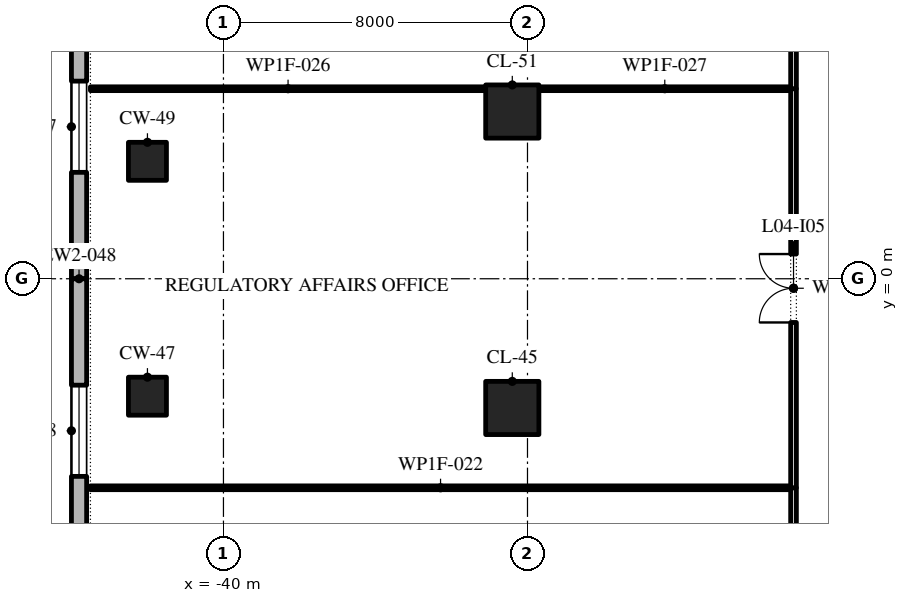
"""IFC4 building model, lengths in metres.
Left out: names, types, materials, properties, quantities, classifications, styles, units other than length and angle.
Written with IfcOpenShell. Run it as: python <this file> out.ifc"""

import sys

from ifc_helpers import new_model, si_unit, direction, frame, frame_2d, origin, origin_2d, place, context, subcontext, project, spatial, polyline, rectangle, outline, extrude, element, fill, save


model = new_model("IFC4")
c1 = context("Model", 3, precision=1e-05, world=origin(), true_north=direction((0.0, 1.0)))
c2 = subcontext(c1, "Body", "Model", "MODEL_VIEW")
j1 = project(units=[si_unit("LENGTHUNIT", "METRE"), si_unit("PLANEANGLEUNIT", "RADIAN")], contexts=[c1])
p1 = place(None, origin())
s1 = spatial("IfcSite", under=j1, at=p1, CompositionType="ELEMENT")
p2 = place(p1, origin())
s2 = spatial("IfcBuilding", under=s1, at=p2, CompositionType="ELEMENT")
p3 = place(p2, frame((0.0, 0.0, 24.0)))
s3 = spatial("IfcBuildingStorey", under=s2, at=p3, CompositionType="ELEMENT", Elevation=24.0)
p4 = place(p3, frame((-32.4, -3.4, 0.0), z_axis=(0.0, 0.0, 1.0), x_axis=(1.0, 0.0, 0.0)))
e1 = element("IfcColumn", 1, at=p4, inside=s3, PredefinedType="COLUMN", context=c2, shape_type="SweptSolid", body=[
    extrude(rectangle(XDim=1.4, YDim=1.4, at=origin_2d()), origin(), (0.0, 0.0, 1.0), 4.8),
])
for number, where, z_axis, x_axis in (
    (2, (-42.0, -3.09, 0.0), (0.0, 0.0, 1.0), (1.0, 0.0, 0.0)),
    (3, (-42.0, 3.09, 0.0), (0.0, 0.0, 1.0), (1.0, 0.0, 0.0)),
):
    element("IfcColumn", number, at=place(p3, frame(where, z_axis=z_axis, x_axis=x_axis)), inside=s3, PredefinedType="COLUMN", context=c2, shape_type="SweptSolid", body=[
        extrude(rectangle(XDim=1.0, YDim=1.0, at=origin_2d()), origin(), (0.0, 0.0, 1.0), 4.8),
    ])
p5 = place(p3, frame((-32.4, 4.4, 0.0), z_axis=(0.0, 0.0, 1.0), x_axis=(1.0, 0.0, 0.0)))
e4 = element("IfcColumn", 4, at=p5, inside=s3, PredefinedType="COLUMN", context=c2, shape_type="SweptSolid", body=[
    extrude(rectangle(XDim=1.4, YDim=1.4, at=origin_2d()), origin(), (0.0, 0.0, 1.0), 4.8),
])
p6 = place(p3, frame((-43.8, 8.0, 0.0), z_axis=(0.0, 0.0, 1.0), x_axis=(0.0, -1.0, 0.0)))
e5 = element("IfcWall", 5, at=p6, inside=s3, PredefinedType="STANDARD", context=c2, shape_type="SweptSolid", body=[
    extrude(rectangle(XDim=8.0, YDim=0.4, at=frame_2d((4.0, 0.0))), origin(), (0.0, 0.0, 1.0), 4.5),
])
p7 = place(p6, frame((2.8, 0.0, 0.9)))
e6 = element("IfcOpeningElement", 6, at=p7, cuts=e5, PredefinedType="OPENING", context=c2, shape_type="SweptSolid", body=[
    extrude(outline(polyline([(0.0, 0.0), (2.4, 0.0), (2.4, 1.5), (2.378, 1.758), (2.313, 2.009), (2.207, 2.245), (2.063, 2.46), (1.885, 2.648), (1.677, 2.804), (1.447, 2.922), (1.2, 3.0), (0.953, 2.922), (0.722, 2.804), (0.515, 2.648), (0.337, 2.46), (0.193, 2.245), (0.087, 2.009), (0.022, 1.758), (0.0, 1.5), (0.0, 0.0)])), frame((0.0, 0.21, 0.0), z_axis=(0.0, -1.0, 0.0), x_axis=(1.0, 0.0, 0.0)), (0.0, 0.0, 1.0), 0.42),
])
p8 = place(p3, frame((-43.8, 0.0, 0.0), z_axis=(0.0, 0.0, 1.0), x_axis=(0.0, -1.0, 0.0)))
e7 = element("IfcWall", 7, at=p8, inside=s3, PredefinedType="STANDARD", context=c2, shape_type="SweptSolid", body=[
    extrude(rectangle(XDim=8.0, YDim=0.4, at=frame_2d((4.0, 0.0))), origin(), (0.0, 0.0, 1.0), 4.5),
])
p9 = place(p8, frame((2.8, 0.0, 0.9)))
e8 = element("IfcOpeningElement", 8, at=p9, cuts=e7, PredefinedType="OPENING", context=c2, shape_type="SweptSolid", body=[
    extrude(outline(polyline([(0.0, 0.0), (2.4, 0.0), (2.4, 1.5), (2.378, 1.758), (2.313, 2.009), (2.207, 2.245), (2.063, 2.46), (1.885, 2.648), (1.677, 2.804), (1.447, 2.922), (1.2, 3.0), (0.953, 2.922), (0.722, 2.804), (0.515, 2.648), (0.337, 2.46), (0.193, 2.245), (0.087, 2.009), (0.022, 1.758), (0.0, 1.5), (0.0, 0.0)])), frame((0.0, 0.21, 0.0), z_axis=(0.0, -1.0, 0.0), x_axis=(1.0, 0.0, 0.0)), (0.0, 0.0, 1.0), 0.42),
])
p10 = place(p3, frame((-43.5, -5.5, 0.0), z_axis=(0.0, 0.0, 1.0), x_axis=(1.0, 0.0, 0.0)))
e9 = element("IfcWall", 9, at=p10, inside=s3, PredefinedType="PARTITIONING", context=c2, shape_type="SweptSolid", body=[
    extrude(rectangle(XDim=18.425, YDim=0.1, at=frame_2d((9.212, 0.0))), origin(), (0.0, 0.0, 1.0), 4.5),
])
p11 = place(p3, frame((-43.5, 5.0, 0.0), z_axis=(0.0, 0.0, 1.0), x_axis=(1.0, 0.0, 0.0)))
e10 = element("IfcWall", 10, at=p11, inside=s3, PredefinedType="PARTITIONING", context=c2, shape_type="SweptSolid", body=[
    extrude(rectangle(XDim=10.4, YDim=0.1, at=frame_2d((5.2, 0.0))), origin(), (0.0, 0.0, 1.0), 4.5),
])
p12 = place(p3, frame((-31.7, 5.0, 0.0), z_axis=(0.0, 0.0, 1.0), x_axis=(1.0, 0.0, 0.0)))
e11 = element("IfcWall", 11, at=p12, inside=s3, PredefinedType="PARTITIONING", context=c2, shape_type="SweptSolid", body=[
    extrude(rectangle(XDim=6.625, YDim=0.1, at=frame_2d((3.312, 0.0))), origin(), (0.0, 0.0, 1.0), 4.5),
])
p13 = place(p3, frame((-25.0, -15.0, 0.0), z_axis=(0.0, 0.0, 1.0), x_axis=(0.0, 1.0, 0.0)))
e12 = element("IfcWall", 12, at=p13, inside=s3, PredefinedType="PARTITIONING", context=c2, shape_type="SweptSolid", body=[
    extrude(rectangle(XDim=9.5, YDim=0.15, at=frame_2d((4.75, 0.0))), origin(), (0.0, 0.0, 1.0), 4.5),
])
p14 = place(p13, frame((3.85, 0.0, 0.0)))
e13 = element("IfcOpeningElement", 13, at=p14, cuts=e12, PredefinedType="OPENING", context=c2, shape_type="SweptSolid", body=[
    extrude(rectangle(XDim=1.8, YDim=2.1, at=frame_2d((0.9, 1.05))), frame((0.0, 0.085, 0.0), z_axis=(0.0, -1.0, 0.0), x_axis=(1.0, 0.0, 0.0)), (0.0, 0.0, 1.0), 0.17),
])
p15 = place(p3, frame((-25.0, -5.5, 0.0), z_axis=(0.0, 0.0, 1.0), x_axis=(0.0, 1.0, 0.0)))
e14 = element("IfcWall", 14, at=p15, inside=s3, PredefinedType="PARTITIONING", context=c2, shape_type="SweptSolid", body=[
    extrude(rectangle(XDim=10.5, YDim=0.15, at=frame_2d((5.25, 0.0))), origin(), (0.0, 0.0, 1.0), 4.5),
])
p16 = place(p15, frame((4.35, 0.0, 0.0)))
e15 = element("IfcOpeningElement", 15, at=p16, cuts=e14, PredefinedType="OPENING", context=c2, shape_type="SweptSolid", body=[
    extrude(rectangle(XDim=1.8, YDim=2.1, at=frame_2d((0.9, 1.05))), frame((0.0, 0.085, 0.0), z_axis=(0.0, -1.0, 0.0), x_axis=(1.0, 0.0, 0.0)), (0.0, 0.0, 1.0), 0.17),
])
p17 = place(p3, frame((-25.0, 5.0, 0.0), z_axis=(0.0, 0.0, 1.0), x_axis=(0.0, 1.0, 0.0)))
e16 = element("IfcWall", 16, at=p17, inside=s3, PredefinedType="PARTITIONING", context=c2, shape_type="SweptSolid", body=[
    extrude(rectangle(XDim=9.5, YDim=0.15, at=frame_2d((4.75, 0.0))), origin(), (0.0, 0.0, 1.0), 4.5),
])
p18 = place(p17, frame((3.85, 0.0, 0.0)))
e17 = element("IfcOpeningElement", 17, at=p18, cuts=e16, PredefinedType="OPENING", context=c2, shape_type="SweptSolid", body=[
    extrude(rectangle(XDim=1.8, YDim=2.1, at=frame_2d((0.9, 1.05))), frame((0.0, 0.085, 0.0), z_axis=(0.0, -1.0, 0.0), x_axis=(1.0, 0.0, 0.0)), (0.0, 0.0, 1.0), 0.17),
])
p19 = place(p7, origin())
e18 = element("IfcWindow", 18, at=p19, inside=s3, PartitioningType="DOUBLE_PANEL_VERTICAL", PredefinedType="WINDOW", context=c2, shape_type="SweptSolid", body=[
    extrude(outline(polyline([(0.0, 0.0), (2.4, 0.0), (2.4, 1.5), (2.378, 1.758), (2.313, 2.009), (2.207, 2.245), (2.063, 2.46), (1.885, 2.648), (1.677, 2.804), (1.447, 2.922), (1.2, 3.0), (0.953, 2.922), (0.722, 2.804), (0.515, 2.648), (0.337, 2.46), (0.193, 2.245), (0.087, 2.009), (0.022, 1.758), (0.0, 1.5), (0.0, 0.0)])), frame((0.0, 0.03, 0.0), z_axis=(0.0, -1.0, 0.0), x_axis=(1.0, 0.0, 0.0)), (0.0, 0.0, 1.0), 0.06),
])
fill(e6, e18)
p20 = place(p9, origin())
e19 = element("IfcWindow", 19, at=p20, inside=s3, PartitioningType="DOUBLE_PANEL_VERTICAL", PredefinedType="WINDOW", context=c2, shape_type="SweptSolid", body=[
    extrude(outline(polyline([(0.0, 0.0), (2.4, 0.0), (2.4, 1.5), (2.378, 1.758), (2.313, 2.009), (2.207, 2.245), (2.063, 2.46), (1.885, 2.648), (1.677, 2.804), (1.447, 2.922), (1.2, 3.0), (0.953, 2.922), (0.722, 2.804), (0.515, 2.648), (0.337, 2.46), (0.193, 2.245), (0.087, 2.009), (0.022, 1.758), (0.0, 1.5), (0.0, 0.0)])), frame((0.0, 0.03, 0.0), z_axis=(0.0, -1.0, 0.0), x_axis=(1.0, 0.0, 0.0)), (0.0, 0.0, 1.0), 0.06),
])
fill(e8, e19)
p21 = place(p16, origin())
e20 = element("IfcDoor", 20, at=p21, inside=s3, OperationType="SINGLE_SWING_RIGHT", PredefinedType="DOOR", context=c2, shape_type="SweptSolid", body=[
    extrude(rectangle(XDim=1.8, YDim=2.1, at=frame_2d((0.9, 1.05))), frame((0.0, 0.025, 0.0), z_axis=(0.0, -1.0, 0.0), x_axis=(1.0, 0.0, 0.0)), (0.0, 0.0, 1.0), 0.05),
])
fill(e15, e20)
save(model, sys.argv[1])
